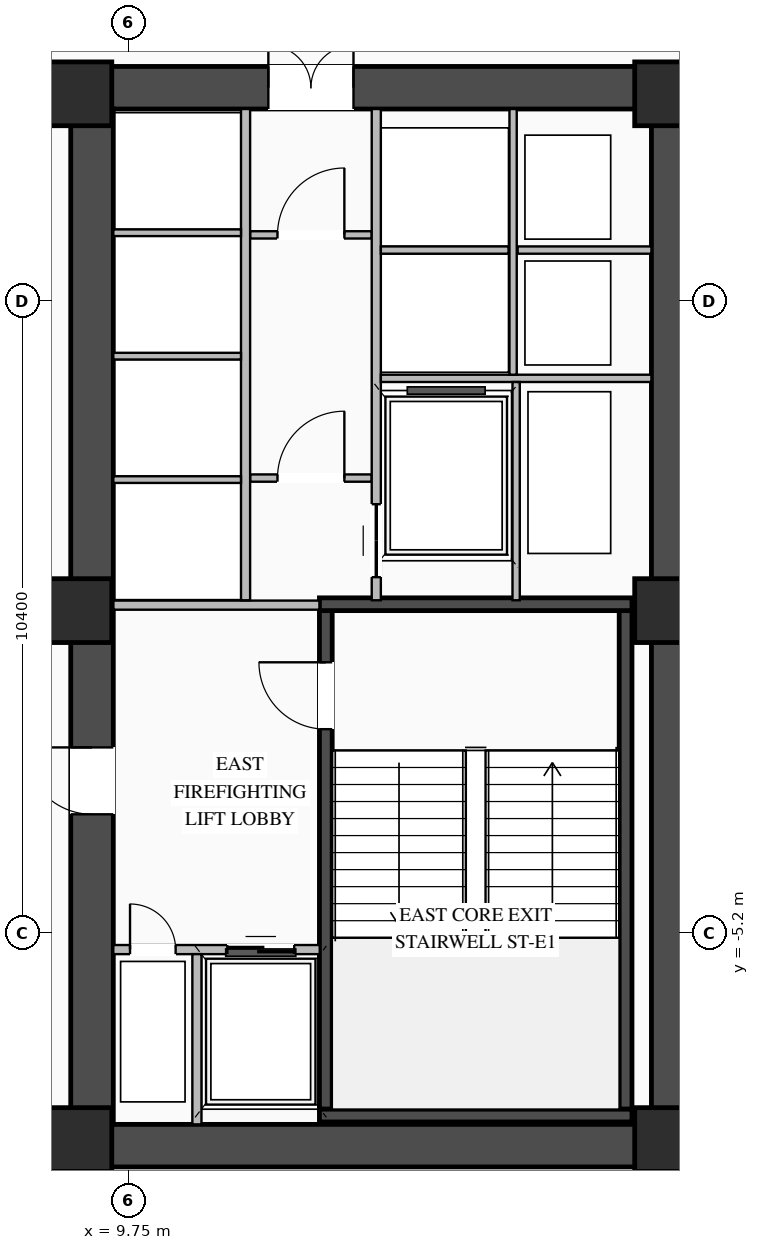
"""IFC4 building model, lengths in metres.
Left out: names, types, materials, properties, quantities, classifications, styles, units other than length and angle.
Written with IfcOpenShell. Run it as: python <this file> out.ifc"""

import sys

from ifc_helpers import new_model, si_unit, direction, frame, frame_2d, origin, origin_2d, place, context, subcontext, project, spatial, rectangle, extrude, element, fill, save


model = new_model("IFC4")
c1 = context("Model", 3, precision=1e-05, world=origin(), true_north=direction((0.0, 1.0)))
c2 = subcontext(c1, "Body", "Model", "MODEL_VIEW")
j1 = project(units=[si_unit("LENGTHUNIT", "METRE"), si_unit("PLANEANGLEUNIT", "RADIAN")], contexts=[c1])
p1 = place(None, origin())
s1 = spatial("IfcSite", under=j1, at=p1, CompositionType="ELEMENT")
p2 = place(p1, origin())
s2 = spatial("IfcBuilding", under=s1, at=p2, CompositionType="ELEMENT")
p3 = place(p2, frame((0.0, 0.0, 70.0)))
s3 = spatial("IfcBuildingStorey", under=s2, at=p3, CompositionType="ELEMENT", Elevation=70.0)
p4 = place(p3, frame((8.8, -8.7, 0.0), z_axis=(0.0, 0.0, 1.0), x_axis=(1.0, 0.0, 0.0)))
e1 = element("IfcWall", 1, at=p4, inside=s3, PredefinedType="SHEAR", context=c2, shape_type="SweptSolid", body=[
    extrude(rectangle(XDim=10.25, YDim=0.7, at=frame_2d((5.125, 0.0))), origin(), (0.0, 0.0, 1.0), 4.02),
])
p5 = place(p3, frame((8.8, 8.7, 0.0), z_axis=(0.0, 0.0, 1.0), x_axis=(1.0, 0.0, 0.0)))
e2 = element("IfcWall", 2, at=p5, inside=s3, PredefinedType="SHEAR", context=c2, shape_type="SweptSolid", body=[
    extrude(rectangle(XDim=10.25, YDim=0.7, at=frame_2d((5.125, 0.0))), origin(), (0.0, 0.0, 1.0), 4.02),
])
p6 = place(p5, frame((3.25, 0.0, 0.0)))
e3 = element("IfcOpeningElement", 3, at=p6, cuts=e2, PredefinedType="OPENING", context=c2, shape_type="SweptSolid", body=[
    extrude(rectangle(XDim=1.4, YDim=2.05, at=frame_2d((0.7, 1.025))), frame((0.0, 0.36, 0.0), z_axis=(0.0, -1.0, 0.0), x_axis=(1.0, 0.0, 0.0)), (0.0, 0.0, 1.0), 0.72),
])
p7 = place(p3, frame((9.15, -8.35, 0.0), z_axis=(0.0, 0.0, 1.0), x_axis=(0.0, 1.0, 0.0)))
e4 = element("IfcWall", 4, at=p7, inside=s3, PredefinedType="SHEAR", context=c2, shape_type="SweptSolid", body=[
    extrude(rectangle(XDim=16.7, YDim=0.7, at=frame_2d((8.35, 0.0))), origin(), (0.0, 0.0, 1.0), 4.02),
])
p8 = place(p7, frame((5.1, 0.0, 0.0)))
e5 = element("IfcOpeningElement", 5, at=p8, cuts=e4, PredefinedType="OPENING", context=c2, shape_type="SweptSolid", body=[
    extrude(rectangle(XDim=1.1, YDim=2.08, at=frame_2d((0.55, 1.04))), frame((0.0, 0.36, 0.0), z_axis=(0.0, -1.0, 0.0), x_axis=(1.0, 0.0, 0.0)), (0.0, 0.0, 1.0), 0.72),
])
p9 = place(p3, frame((18.7, -8.35, 0.0), z_axis=(0.0, 0.0, 1.0), x_axis=(0.0, 1.0, 0.0)))
e6 = element("IfcWall", 6, at=p9, inside=s3, PredefinedType="SHEAR", context=c2, shape_type="SweptSolid", body=[
    extrude(rectangle(XDim=16.7, YDim=0.7, at=frame_2d((8.35, 0.0))), origin(), (0.0, 0.0, 1.0), 4.02),
])
p10 = place(p3, frame((12.995, -8.1, 0.0), z_axis=(0.0, 0.0, 1.0), x_axis=(0.0, 1.0, 0.0)))
e7 = element("IfcWall", 7, at=p10, inside=s3, PredefinedType="SHEAR", context=c2, shape_type="SweptSolid", body=[
    extrude(rectangle(XDim=8.2, YDim=0.21, at=frame_2d((4.1, 0.0))), origin(), (0.0, 0.0, 1.0), 4.02),
])
p11 = place(p10, frame((6.25, 0.0, 0.0)))
e8 = element("IfcOpeningElement", 8, at=p11, cuts=e7, PredefinedType="OPENING", context=c2, shape_type="SweptSolid", body=[
    extrude(rectangle(XDim=1.1, YDim=2.15, at=frame_2d((0.55, 1.075))), frame((0.0, 0.115, 0.0), z_axis=(0.0, -1.0, 0.0), x_axis=(1.0, 0.0, 0.0)), (0.0, 0.0, 1.0), 0.23),
])
p12 = place(p3, frame((17.925, -8.1, 0.0), z_axis=(0.0, 0.0, 1.0), x_axis=(0.0, 1.0, 0.0)))
e9 = element("IfcWall", 9, at=p12, inside=s3, PredefinedType="SHEAR", context=c2, shape_type="SweptSolid", body=[
    extrude(rectangle(XDim=8.2, YDim=0.21, at=frame_2d((4.1, 0.0))), origin(), (0.0, 0.0, 1.0), 4.02),
])
for number, where, z_axis, x_axis in (
    (10, (12.89, -8.205, 0.0), (0.0, 0.0, 1.0), (1.0, 0.0, 0.0)),
    (11, (18.03, 0.205, 0.0), (0.0, 0.0, 1.0), (-1.0, 0.0, 0.0)),
):
    element("IfcWall", number, at=place(p3, frame(where, z_axis=z_axis, x_axis=x_axis)), inside=s3, PredefinedType="SHEAR", context=c2, shape_type="SweptSolid", body=[
        extrude(rectangle(XDim=5.14, YDim=0.21, at=frame_2d((2.57, 0.0))), origin(), (0.0, 0.0, 1.0), 4.02),
    ])
for number, where, z_axis, x_axis in (
    (12, (8.95, -8.6, 0.0), (0.0, 0.0, 1.0), (1.0, 0.0, 0.0)),
    (13, (8.95, 0.1, 0.0), (0.0, 0.0, 1.0), (1.0, 0.0, 0.0)),
    (14, (8.95, 8.6, 0.0), (0.0, 0.0, 1.0), (1.0, 0.0, 0.0)),
    (15, (18.6, -8.6, 0.0), (0.0, 0.0, 1.0), (1.0, 0.0, 0.0)),
    (16, (18.6, 0.1, 0.0), (0.0, 0.0, 1.0), (1.0, 0.0, 0.0)),
    (17, (18.6, 8.6, 0.0), (0.0, 0.0, 1.0), (1.0, 0.0, 0.0)),
):
    element("IfcColumn", number, at=place(p3, frame(where, z_axis=z_axis, x_axis=x_axis)), inside=s3, PredefinedType="COLUMN", context=c2, shape_type="SweptSolid", body=[
        extrude(rectangle(XDim=1.05, YDim=1.05, at=origin_2d()), origin(), (0.0, 0.0, 1.0), 4.2),
    ])
p13 = place(p3, frame((9.5, -5.475, 0.0), z_axis=(0.0, 0.0, 1.0), x_axis=(1.0, 0.0, 0.0)))
e18 = element("IfcWall", 18, at=p13, inside=s3, PredefinedType="STANDARD", context=c2, shape_type="SweptSolid", body=[
    extrude(rectangle(XDim=3.395, YDim=0.15, at=frame_2d((1.698, 0.0))), origin(), (0.0, 0.0, 1.0), 4.0),
])
p14 = place(p13, frame((1.875, 0.0, 0.0)))
e19 = element("IfcOpeningElement", 19, at=p14, cuts=e18, PredefinedType="OPENING", context=c2, shape_type="SweptSolid", body=[
    extrude(rectangle(XDim=1.1, YDim=2.15, at=frame_2d((0.55, 1.075))), frame((0.0, 0.085, 0.0), z_axis=(0.0, -1.0, 0.0), x_axis=(1.0, 0.0, 0.0)), (0.0, 0.0, 1.0), 0.17),
])
p15 = place(p13, frame((0.275, 0.0, 0.0)))
e20 = element("IfcOpeningElement", 20, at=p15, cuts=e18, PredefinedType="OPENING", context=c2, shape_type="SweptSolid", body=[
    extrude(rectangle(XDim=0.75, YDim=2.05, at=frame_2d((0.375, 1.025))), frame((0.0, 0.085, 0.0), z_axis=(0.0, -1.0, 0.0), x_axis=(1.0, 0.0, 0.0)), (0.0, 0.0, 1.0), 0.17),
])
p16 = place(p3, frame((10.875, -8.35, 0.0), z_axis=(0.0, 0.0, 1.0), x_axis=(0.0, 1.0, 0.0)))
e21 = element("IfcWall", 21, at=p16, inside=s3, PredefinedType="STANDARD", context=c2, shape_type="SweptSolid", body=[
    extrude(rectangle(XDim=2.8, YDim=0.15, at=frame_2d((1.4, 0.0))), origin(), (0.0, 0.0, 1.0), 4.0),
])
p17 = place(p3, frame((9.5, 0.19, 0.0), z_axis=(0.0, 0.0, 1.0), x_axis=(1.0, 0.0, 0.0)))
e22 = element("IfcWall", 22, at=p17, inside=s3, PredefinedType="STANDARD", context=c2, shape_type="SweptSolid", body=[
    extrude(rectangle(XDim=3.39, YDim=0.15, at=frame_2d((1.695, 0.0))), origin(), (0.0, 0.0, 1.0), 3.395),
])
p18 = place(p3, frame((11.75, 2.28, 0.0), z_axis=(0.0, 0.0, 1.0), x_axis=(1.0, 0.0, 0.0)))
e23 = element("IfcWall", 23, at=p18, inside=s3, PredefinedType="STANDARD", context=c2, shape_type="SweptSolid", body=[
    extrude(rectangle(XDim=2.0, YDim=0.12, at=frame_2d((1.0, 0.0))), origin(), (0.0, 0.0, 1.0), 4.0),
])
p19 = place(p18, frame((0.45, 0.0, 0.0)))
e24 = element("IfcOpeningElement", 24, at=p19, cuts=e23, PredefinedType="OPENING", context=c2, shape_type="SweptSolid", body=[
    extrude(rectangle(XDim=1.1, YDim=2.1, at=frame_2d((0.55, 1.05))), frame((0.0, 0.07, 0.0), z_axis=(0.0, -1.0, 0.0), x_axis=(1.0, 0.0, 0.0)), (0.0, 0.0, 1.0), 0.14),
])
p20 = place(p3, frame((11.75, 6.28, 0.0), z_axis=(0.0, 0.0, 1.0), x_axis=(1.0, 0.0, 0.0)))
e25 = element("IfcWall", 25, at=p20, inside=s3, PredefinedType="STANDARD", context=c2, shape_type="SweptSolid", body=[
    extrude(rectangle(XDim=2.0, YDim=0.12, at=frame_2d((1.0, 0.0))), origin(), (0.0, 0.0, 1.0), 4.0),
])
p21 = place(p20, frame((0.45, 0.0, 0.0)))
e26 = element("IfcOpeningElement", 26, at=p21, cuts=e25, PredefinedType="OPENING", context=c2, shape_type="SweptSolid", body=[
    extrude(rectangle(XDim=1.1, YDim=2.1, at=frame_2d((0.55, 1.05))), frame((0.0, 0.07, 0.0), z_axis=(0.0, -1.0, 0.0), x_axis=(1.0, 0.0, 0.0)), (0.0, 0.0, 1.0), 0.14),
])
p22 = place(p3, frame((11.675, 0.27, 0.0), z_axis=(0.0, 0.0, 1.0), x_axis=(0.0, 1.0, 0.0)))
e27 = element("IfcWall", 27, at=p22, inside=s3, PredefinedType="STANDARD", context=c2, shape_type="SweptSolid", body=[
    extrude(rectangle(XDim=8.08, YDim=0.15, at=frame_2d((4.04, 0.0))), origin(), (0.0, 0.0, 1.0), 4.0),
])
for number, where, z_axis, x_axis in (
    (28, (9.5, 2.255, 0.0), (0.0, 0.0, 1.0), (1.0, 0.0, 0.0)),
    (29, (9.5, 4.285, 0.0), (0.0, 0.0, 1.0), (1.0, 0.0, 0.0)),
    (30, (9.5, 6.315, 0.0), (0.0, 0.0, 1.0), (1.0, 0.0, 0.0)),
):
    element("IfcWall", number, at=place(p3, frame(where, z_axis=z_axis, x_axis=x_axis)), inside=s3, PredefinedType="STANDARD", context=c2, shape_type="SweptSolid", body=[
        extrude(rectangle(XDim=2.1, YDim=0.11, at=frame_2d((1.05, 0.0))), origin(), (0.0, 0.0, 1.0), 4.0),
    ])
p23 = place(p3, frame((13.825, 0.27, 0.0), z_axis=(0.0, 0.0, 1.0), x_axis=(0.0, 1.0, 0.0)))
e31 = element("IfcWall", 31, at=p23, inside=s3, PredefinedType="STANDARD", context=c2, shape_type="SweptSolid", body=[
    extrude(rectangle(XDim=8.08, YDim=0.15, at=frame_2d((4.04, 0.0))), origin(), (0.0, 0.0, 1.0), 4.0),
])
p24 = place(p23, frame((0.38, 0.0, 0.0)))
e32 = element("IfcOpeningElement", 32, at=p24, cuts=e31, PredefinedType="OPENING", context=c2, shape_type="SweptSolid", body=[
    extrude(rectangle(XDim=1.2, YDim=2.1, at=frame_2d((0.6, 1.05))), frame((0.0, 0.085, 0.0), z_axis=(0.0, -1.0, 0.0), x_axis=(1.0, 0.0, 0.0)), (0.0, 0.0, 1.0), 0.17),
])
p25 = place(p3, frame((13.9, 3.92, 0.0), z_axis=(0.0, 0.0, 1.0), x_axis=(1.0, 0.0, 0.0)))
e33 = element("IfcWall", 33, at=p25, inside=s3, PredefinedType="STANDARD", context=c2, shape_type="SweptSolid", body=[
    extrude(rectangle(XDim=4.45, YDim=0.12, at=frame_2d((2.225, 0.0))), origin(), (0.0, 0.0, 1.0), 4.0),
])
p26 = place(p3, frame((16.15, 6.03, 0.0), z_axis=(0.0, 0.0, 1.0), x_axis=(1.0, 0.0, 0.0)))
e34 = element("IfcWall", 34, at=p26, inside=s3, PredefinedType="STANDARD", context=c2, shape_type="SweptSolid", body=[
    extrude(rectangle(XDim=2.2, YDim=0.12, at=frame_2d((1.1, 0.0))), origin(), (0.0, 0.0, 1.0), 4.0),
])
p27 = place(p3, frame((16.075, 3.98, 0.0), z_axis=(0.0, 0.0, 1.0), x_axis=(0.0, 1.0, 0.0)))
e35 = element("IfcWall", 35, at=p27, inside=s3, PredefinedType="STANDARD", context=c2, shape_type="SweptSolid", body=[
    extrude(rectangle(XDim=4.37, YDim=0.12, at=frame_2d((2.185, 0.0))), origin(), (0.0, 0.0, 1.0), 4.0),
])
p28 = place(p3, frame((13.9, 6.03, 0.0), z_axis=(0.0, 0.0, 1.0), x_axis=(1.0, 0.0, 0.0)))
e36 = element("IfcWall", 36, at=p28, inside=s3, PredefinedType="STANDARD", context=c2, shape_type="SweptSolid", body=[
    extrude(rectangle(XDim=2.1, YDim=0.12, at=frame_2d((1.05, 0.0))), origin(), (0.0, 0.0, 1.0), 4.0),
])
p29 = place(p3, frame((16.125, 0.27, 0.0), z_axis=(0.0, 0.0, 1.0), x_axis=(0.0, 1.0, 0.0)))
e37 = element("IfcWall", 37, at=p29, inside=s3, PredefinedType="STANDARD", context=c2, shape_type="SweptSolid", body=[
    extrude(rectangle(XDim=3.59, YDim=0.12, at=frame_2d((1.795, 0.0))), origin(), (0.0, 0.0, 1.0), 4.0),
])
p30 = place(p11, origin())
e38 = element("IfcDoor", 38, at=p30, inside=s3, OperationType="SINGLE_SWING_RIGHT", PredefinedType="DOOR", context=c2, shape_type="SweptSolid", body=[
    extrude(rectangle(XDim=1.1, YDim=2.15, at=frame_2d((0.55, 1.075))), frame((0.0, 0.025, 0.0), z_axis=(0.0, -1.0, 0.0), x_axis=(1.0, 0.0, 0.0)), (0.0, 0.0, 1.0), 0.05),
])
fill(e8, e38)
p31 = place(p14, origin())
e39 = element("IfcDoor", 39, at=p31, inside=s3, OperationType="DOUBLE_DOOR_SLIDING", PredefinedType="DOOR", context=c2, shape_type="SweptSolid", body=[
    extrude(rectangle(XDim=1.1, YDim=2.15, at=frame_2d((0.55, 1.075))), frame((0.0, 0.025, 0.0), z_axis=(0.0, -1.0, 0.0), x_axis=(1.0, 0.0, 0.0)), (0.0, 0.0, 1.0), 0.05),
])
fill(e19, e39)
p32 = place(p15, origin())
e40 = element("IfcDoor", 40, at=p32, inside=s3, OperationType="SINGLE_SWING_LEFT", PredefinedType="DOOR", context=c2, shape_type="SweptSolid", body=[
    extrude(rectangle(XDim=0.75, YDim=2.05, at=frame_2d((0.375, 1.025))), frame((0.0, 0.025, 0.0), z_axis=(0.0, -1.0, 0.0), x_axis=(1.0, 0.0, 0.0)), (0.0, 0.0, 1.0), 0.05),
])
fill(e20, e40)
p33 = place(p8, origin())
e41 = element("IfcDoor", 41, at=p33, inside=s3, OperationType="SINGLE_SWING_RIGHT", PredefinedType="DOOR", context=c2, shape_type="SweptSolid", body=[
    extrude(rectangle(XDim=1.1, YDim=2.08, at=frame_2d((0.55, 1.04))), frame((0.0, -0.255, 0.0), z_axis=(0.0, -1.0, 0.0), x_axis=(1.0, 0.0, 0.0)), (0.0, 0.0, 1.0), 0.05),
])
fill(e5, e41)
p34 = place(p19, origin())
e42 = element("IfcDoor", 42, at=p34, inside=s3, OperationType="SINGLE_SWING_RIGHT", PredefinedType="DOOR", context=c2, shape_type="SweptSolid", body=[
    extrude(rectangle(XDim=1.1, YDim=2.1, at=frame_2d((0.55, 1.05))), frame((0.0, 0.025, 0.0), z_axis=(0.0, -1.0, 0.0), x_axis=(1.0, 0.0, 0.0)), (0.0, 0.0, 1.0), 0.05),
])
fill(e24, e42)
p35 = place(p21, origin())
e43 = element("IfcDoor", 43, at=p35, inside=s3, OperationType="SINGLE_SWING_RIGHT", PredefinedType="DOOR", context=c2, shape_type="SweptSolid", body=[
    extrude(rectangle(XDim=1.1, YDim=2.1, at=frame_2d((0.55, 1.05))), frame((0.0, 0.025, 0.0), z_axis=(0.0, -1.0, 0.0), x_axis=(1.0, 0.0, 0.0)), (0.0, 0.0, 1.0), 0.05),
])
fill(e26, e43)
p36 = place(p6, origin())
e44 = element("IfcDoor", 44, at=p36, inside=s3, OperationType="DOUBLE_DOOR_SINGLE_SWING", PredefinedType="DOOR", context=c2, shape_type="SweptSolid", body=[
    extrude(rectangle(XDim=1.4, YDim=2.05, at=frame_2d((0.7, 1.025))), frame((0.0, 0.295, 0.0), z_axis=(0.0, -1.0, 0.0), x_axis=(1.0, 0.0, 0.0)), (0.0, 0.0, 1.0), 0.05),
])
fill(e3, e44)
p37 = place(p24, origin())
e45 = element("IfcDoor", 45, at=p37, inside=s3, OperationType="DOUBLE_DOOR_SLIDING", PredefinedType="DOOR", context=c2, shape_type="SweptSolid", body=[
    extrude(rectangle(XDim=1.2, YDim=2.1, at=frame_2d((0.6, 1.05))), frame((0.0, 0.025, 0.0), z_axis=(0.0, -1.0, 0.0), x_axis=(1.0, 0.0, 0.0)), (0.0, 0.0, 1.0), 0.05),
])
fill(e32, e45)
save(model, sys.argv[1])
